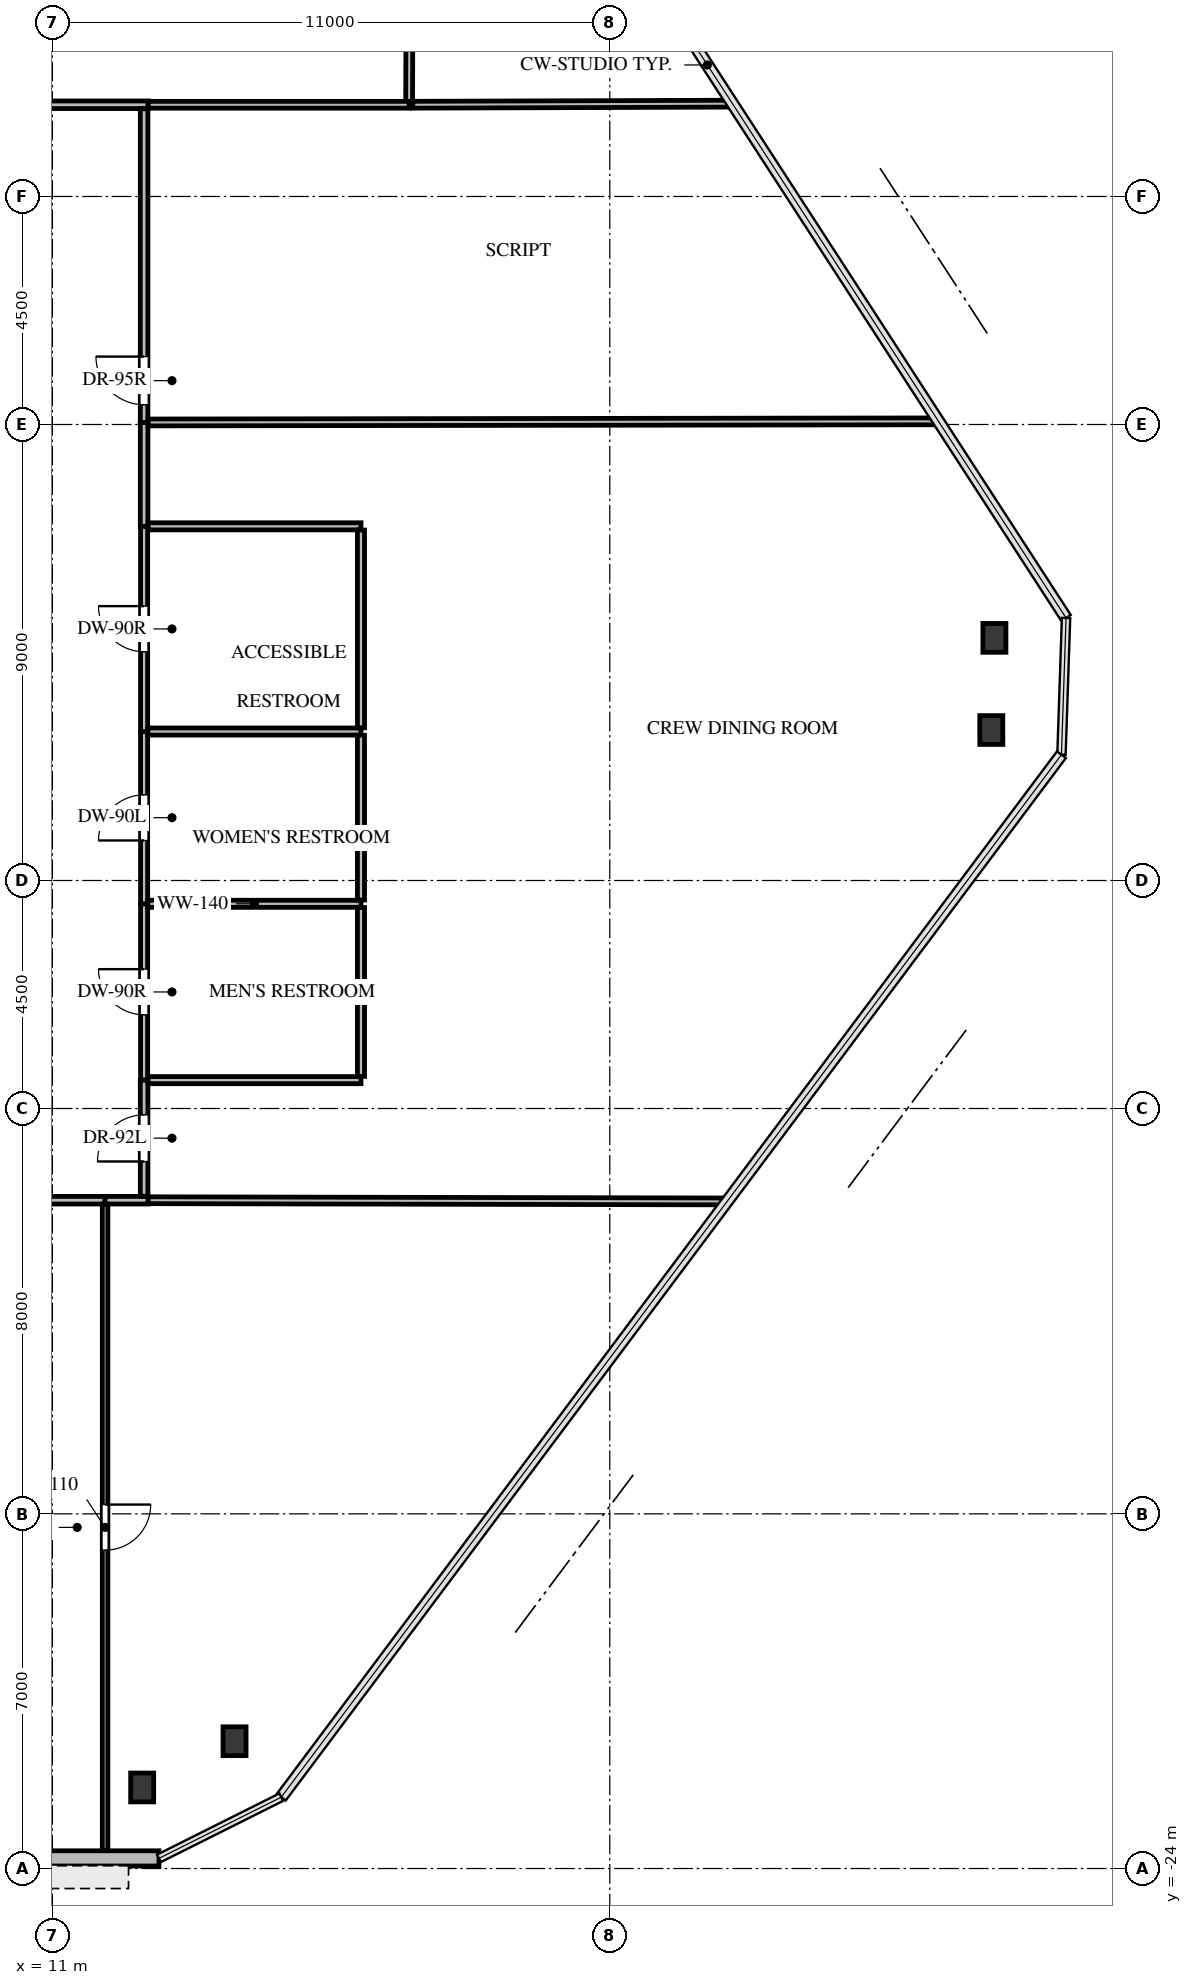
"""IFC4 building model, lengths in metres.
Left out: names, types, materials, properties, quantities, classifications, styles, units other than length and angle.
Written with IfcOpenShell. Run it as: python <this file> out.ifc"""

import sys

from ifc_helpers import new_model, si_unit, direction, frame, frame_2d, origin, origin_2d, place, context, subcontext, project, spatial, rectangle, i_section, extrude, source, transform, mapped, element, fill, save


model = new_model("IFC4")
c1 = context("Model", 3, precision=1e-05, world=origin(), true_north=direction((0.0, 1.0)))
c2 = subcontext(c1, "Body", "Model", "MODEL_VIEW")
j1 = project(units=[si_unit("LENGTHUNIT", "METRE"), si_unit("PLANEANGLEUNIT", "RADIAN")], contexts=[c1])
p1 = place(None, origin())
s1 = spatial("IfcSite", under=j1, at=p1, CompositionType="ELEMENT")
p2 = place(p1, origin())
s2 = spatial("IfcBuilding", under=s1, at=p2, CompositionType="ELEMENT")
p3 = place(p2, frame((0.0, 0.0, 21.2)))
s3 = spatial("IfcBuildingStorey", under=s2, at=p3, CompositionType="ELEMENT", Elevation=21.2)
m1 = source(origin(), c2, "Body", "SweptSolid", [
    extrude(i_section(OverallWidth=0.454, OverallDepth=0.569, WebThickness=0.078, FlangeThickness=0.125, FilletRadius=0.031, at=origin_2d()), origin(), (0.0, 0.0, 1.0), 5.6),
])
for number, where, z_axis, x_axis in (
    (1, (29.591, 0.289, -0.32), (0.0, 0.0, 1.0), (1.0, 0.0, 0.0)),
    (2, (29.529, -1.531, -0.32), (0.0, 0.0, 1.0), (1.0, 0.0, 0.0)),
    (3, (14.594, -21.488, -0.32), (0.0, 0.0, 1.0), (1.0, 0.0, 0.0)),
    (4, (12.772, -22.4, -0.32), (0.0, 0.0, 1.0), (1.0, 0.0, 0.0)),
):
    element("IfcColumn", number, at=place(p3, frame(where, z_axis=z_axis, x_axis=x_axis)), inside=s3, PredefinedType="COLUMN", context=c2, shape_type="MappedRepresentation", body=[
        mapped(m1, transform((0.0, 0.0, 0.0), x_axis=(1.0, 0.0, 0.0), y_axis=(0.0, 1.0, 0.0), z_axis=(0.0, 0.0, 1.0), scale=1.0)),
    ])
p4 = place(p3, frame((13.103, -23.8, 0.0), z_axis=(0.0, 0.0, 1.0), x_axis=(-1.0, 0.0, 0.0)))
e5 = element("IfcWall", 5, at=p4, inside=s3, PredefinedType="SOLIDWALL", context=c2, shape_type="SweptSolid", body=[
    extrude(rectangle(XDim=27.578, YDim=0.3, at=frame_2d((13.789, 0.0))), origin(), (0.0, 0.0, 1.0), 5.28),
])
p5 = place(p4, frame((3.0, 0.0, 1.0)))
e6 = element("IfcOpeningElement", 6, at=p5, cuts=e5, PredefinedType="OPENING", context=c2, shape_type="SweptSolid", body=[
    extrude(rectangle(XDim=2.4, YDim=2.1, at=frame_2d((1.2, 1.05))), frame((0.0, 0.16, 0.0), z_axis=(0.0, -1.0, 0.0), x_axis=(1.0, 0.0, 0.0)), (0.0, 0.0, 1.0), 0.32),
])
p6 = place(p4, frame((22.178, 0.0, 1.0)))
e7 = element("IfcOpeningElement", 7, at=p6, cuts=e5, PredefinedType="OPENING", context=c2, shape_type="SweptSolid", body=[
    extrude(rectangle(XDim=2.4, YDim=2.1, at=frame_2d((1.2, 1.05))), frame((0.0, 0.16, 0.0), z_axis=(0.0, -1.0, 0.0), x_axis=(1.0, 0.0, 0.0)), (0.0, 0.0, 1.0), 0.32),
])
p7 = place(p3, frame((12.81, -8.44, 0.0), z_axis=(0.0, 0.0, 1.0), x_axis=(0.0, 1.0, 0.0)))
e8 = element("IfcWall", 8, at=p7, inside=s3, PredefinedType="PARTITIONING", context=c2, shape_type="SweptSolid", body=[
    extrude(rectangle(XDim=3.48, YDim=0.14, at=frame_2d((1.74, 0.0))), origin(), (0.0, 0.0, 1.0), 5.265),
])
p8 = place(p7, frame((1.29, 0.0, 0.0)))
e9 = element("IfcOpeningElement", 9, at=p8, cuts=e8, PredefinedType="OPENING", context=c2, shape_type="SweptSolid", body=[
    extrude(rectangle(XDim=0.9, YDim=2.05, at=frame_2d((0.45, 1.025))), frame((0.0, 0.08, 0.0), z_axis=(0.0, -1.0, 0.0), x_axis=(1.0, 0.0, 0.0)), (0.0, 0.0, 1.0), 0.16),
])
p9 = place(p3, frame((12.81, -4.96, 0.0), z_axis=(0.0, 0.0, 1.0), x_axis=(0.0, 1.0, 0.0)))
e10 = element("IfcWall", 10, at=p9, inside=s3, PredefinedType="PARTITIONING", context=c2, shape_type="SweptSolid", body=[
    extrude(rectangle(XDim=3.4, YDim=0.14, at=frame_2d((1.7, 0.0))), origin(), (0.0, 0.0, 1.0), 4.285),
])
p10 = place(p9, frame((1.25, 0.0, 0.0)))
e11 = element("IfcOpeningElement", 11, at=p10, cuts=e10, PredefinedType="OPENING", context=c2, shape_type="SweptSolid", body=[
    extrude(rectangle(XDim=0.9, YDim=2.05, at=frame_2d((0.45, 1.025))), frame((0.0, 0.08, 0.0), z_axis=(0.0, -1.0, 0.0), x_axis=(1.0, 0.0, 0.0)), (0.0, 0.0, 1.0), 0.16),
])
p11 = place(p3, frame((12.81, -1.56, 0.0), z_axis=(0.0, 0.0, 1.0), x_axis=(0.0, 1.0, 0.0)))
e12 = element("IfcWall", 12, at=p11, inside=s3, PredefinedType="PARTITIONING", context=c2, shape_type="SweptSolid", body=[
    extrude(rectangle(XDim=4.05, YDim=0.14, at=frame_2d((2.025, 0.0))), origin(), (0.0, 0.0, 1.0), 4.285),
])
p12 = place(p11, frame((1.575, 0.0, 0.0)))
e13 = element("IfcOpeningElement", 13, at=p12, cuts=e12, PredefinedType="OPENING", context=c2, shape_type="SweptSolid", body=[
    extrude(rectangle(XDim=0.9, YDim=2.05, at=frame_2d((0.45, 1.025))), frame((0.0, 0.08, 0.0), z_axis=(0.0, -1.0, 0.0), x_axis=(1.0, 0.0, 0.0)), (0.0, 0.0, 1.0), 0.16),
])
p13 = place(p3, frame((12.89, 10.81, 0.0), z_axis=(0.0, 0.0, 1.0), x_axis=(-1.0, 0.0, 0.0)))
e14 = element("IfcWall", 14, at=p13, inside=s3, PredefinedType="PARTITIONING", context=c2, shape_type="SweptSolid", body=[
    extrude(rectangle(XDim=4.85, YDim=0.15, at=frame_2d((2.425, 0.0))), origin(), (0.0, 0.0, 1.0), 4.285),
])
p14 = place(p13, frame((1.95, 0.0, 0.0)))
e15 = element("IfcOpeningElement", 15, at=p14, cuts=e14, PredefinedType="OPENING", context=c2, shape_type="SweptSolid", body=[
    extrude(rectangle(XDim=0.95, YDim=2.1, at=frame_2d((0.475, 1.05))), frame((0.0, 0.085, 0.0), z_axis=(0.0, -1.0, 0.0), x_axis=(1.0, 0.0, 0.0)), (0.0, 0.0, 1.0), 0.17),
])
p15 = place(p3, frame((0.04, -10.81, 0.0), z_axis=(0.0, 0.0, 1.0), x_axis=(1.0, 0.0, 0.0)))
e16 = element("IfcWall", 16, at=p15, inside=s3, PredefinedType="PARTITIONING", context=c2, shape_type="SweptSolid", body=[
    extrude(rectangle(XDim=12.0, YDim=0.15, at=frame_2d((6.0, 0.0))), origin(), (0.0, 0.0, 1.0), 4.285),
])
p16 = place(p15, frame((0.35, 0.0, 0.0)))
e17 = element("IfcOpeningElement", 17, at=p16, cuts=e16, PredefinedType="OPENING", context=c2, shape_type="SweptSolid", body=[
    extrude(rectangle(XDim=1.6, YDim=2.15, at=frame_2d((0.8, 1.075))), frame((0.0, 0.085, 0.0), z_axis=(0.0, -1.0, 0.0), x_axis=(1.0, 0.0, 0.0)), (0.0, 0.0, 1.0), 0.17),
])
p17 = place(p3, frame((12.04, -10.81, 0.0), z_axis=(0.0, 0.0, 1.0), x_axis=(1.0, 0.0, 0.0)))
e18 = element("IfcWall", 18, at=p17, inside=s3, PredefinedType="PARTITIONING", context=c2, shape_type="SweptSolid", body=[
    extrude(rectangle(XDim=0.85, YDim=0.15, at=frame_2d((0.425, 0.0))), origin(), (0.0, 0.0, 1.0), 5.265),
])
p18 = place(p3, frame((12.81, -10.731, 0.0), z_axis=(0.0, 0.0, 1.0), x_axis=(0.0, 1.0, 0.0)))
e19 = element("IfcWall", 19, at=p18, inside=s3, PredefinedType="PARTITIONING", context=c2, shape_type="SweptSolid", body=[
    extrude(rectangle(XDim=2.291, YDim=0.15, at=frame_2d((1.146, 0.0))), origin(), (0.0, 0.0, 1.0), 5.265),
])
p19 = place(p18, frame((0.686, 0.0, 0.0)))
e20 = element("IfcOpeningElement", 20, at=p19, cuts=e19, PredefinedType="OPENING", context=c2, shape_type="SweptSolid", body=[
    extrude(rectangle(XDim=0.92, YDim=2.1, at=frame_2d((0.46, 1.05))), frame((0.0, 0.085, 0.0), z_axis=(0.0, -1.0, 0.0), x_axis=(1.0, 0.0, 0.0)), (0.0, 0.0, 1.0), 0.17),
])
p20 = place(p3, frame((12.81, 2.49, 0.0), z_axis=(0.0, 0.0, 1.0), x_axis=(0.0, 1.0, 0.0)))
e21 = element("IfcWall", 21, at=p20, inside=s3, PredefinedType="PARTITIONING", context=c2, shape_type="SweptSolid", body=[
    extrude(rectangle(XDim=2.05, YDim=0.15, at=frame_2d((1.025, 0.0))), origin(), (0.0, 0.0, 1.0), 5.265),
])
p21 = place(p3, frame((12.81, 4.54, 0.0), z_axis=(0.0, 0.0, 1.0), x_axis=(0.0, 1.0, 0.0)))
e22 = element("IfcWall", 22, at=p21, inside=s3, PredefinedType="PARTITIONING", context=c2, shape_type="SweptSolid", body=[
    extrude(rectangle(XDim=6.191, YDim=0.15, at=frame_2d((3.095, 0.0))), origin(), (0.0, 0.0, 1.0), 5.265),
])
p22 = place(p21, frame((0.35, 0.0, 0.0)))
e23 = element("IfcOpeningElement", 23, at=p22, cuts=e22, PredefinedType="OPENING", context=c2, shape_type="SweptSolid", body=[
    extrude(rectangle(XDim=0.95, YDim=2.1, at=frame_2d((0.475, 1.05))), frame((0.0, 0.085, 0.0), z_axis=(0.0, -1.0, 0.0), x_axis=(1.0, 0.0, 0.0)), (0.0, 0.0, 1.0), 0.17),
])
p23 = place(p3, frame((12.884, -4.96, 0.0), z_axis=(0.0, 0.0, 1.0), x_axis=(1.0, 0.0, 0.0)))
e24 = element("IfcWall", 24, at=p23, inside=s3, PredefinedType="PARTITIONING", context=c2, shape_type="SweptSolid", body=[
    extrude(rectangle(XDim=4.206, YDim=0.14, at=frame_2d((2.103, 0.0))), origin(), (0.0, 0.0, 1.0), 5.265),
])
p24 = place(p3, frame((17.09, -8.44, 0.0), z_axis=(0.0, 0.0, 1.0), x_axis=(-1.0, 0.0, 0.0)))
e25 = element("IfcWall", 25, at=p24, inside=s3, PredefinedType="PARTITIONING", context=c2, shape_type="SweptSolid", body=[
    extrude(rectangle(XDim=4.201, YDim=0.14, at=frame_2d((2.101, 0.0))), origin(), (0.0, 0.0, 1.0), 5.265),
])
p25 = place(p3, frame((17.09, -5.034, 0.0), z_axis=(0.0, 0.0, 1.0), x_axis=(0.0, -1.0, 0.0)))
e26 = element("IfcWall", 26, at=p25, inside=s3, PredefinedType="PARTITIONING", context=c2, shape_type="SweptSolid", body=[
    extrude(rectangle(XDim=3.332, YDim=0.14, at=frame_2d((1.666, 0.0))), origin(), (0.0, 0.0, 1.0), 5.265),
])
p26 = place(p3, frame((12.884, -1.56, 0.0), z_axis=(0.0, 0.0, 1.0), x_axis=(1.0, 0.0, 0.0)))
e27 = element("IfcWall", 27, at=p26, inside=s3, PredefinedType="PARTITIONING", context=c2, shape_type="SweptSolid", body=[
    extrude(rectangle(XDim=4.206, YDim=0.14, at=frame_2d((2.103, 0.0))), origin(), (0.0, 0.0, 1.0), 5.265),
])
p27 = place(p3, frame((17.09, -1.634, 0.0), z_axis=(0.0, 0.0, 1.0), x_axis=(0.0, -1.0, 0.0)))
e28 = element("IfcWall", 28, at=p27, inside=s3, PredefinedType="PARTITIONING", context=c2, shape_type="SweptSolid", body=[
    extrude(rectangle(XDim=3.252, YDim=0.14, at=frame_2d((1.626, 0.0))), origin(), (0.0, 0.0, 1.0), 4.285),
])
p28 = place(p3, frame((12.889, 2.49, 0.0), z_axis=(0.0, 0.0, 1.0), x_axis=(1.0, 0.0, 0.0)))
e29 = element("IfcWall", 29, at=p28, inside=s3, PredefinedType="PARTITIONING", context=c2, shape_type="SweptSolid", body=[
    extrude(rectangle(XDim=4.201, YDim=0.14, at=frame_2d((2.101, 0.0))), origin(), (0.0, 0.0, 1.0), 5.265),
])
p29 = place(p3, frame((17.09, 2.416, 0.0), z_axis=(0.0, 0.0, 1.0), x_axis=(0.0, -1.0, 0.0)))
e30 = element("IfcWall", 30, at=p29, inside=s3, PredefinedType="PARTITIONING", context=c2, shape_type="SweptSolid", body=[
    extrude(rectangle(XDim=3.902, YDim=0.14, at=frame_2d((1.951, 0.0))), origin(), (0.0, 0.0, 1.0), 4.285),
])
p30 = place(p3, frame((18.073, 20.62, 0.0), z_axis=(0.0, 0.0, 1.0), x_axis=(-0.003409382171, -0.99999418804, 0.0)))
e31 = element("IfcWall", 31, at=p30, inside=s3, PredefinedType="PARTITIONING", context=c2, shape_type="SweptSolid", body=[
    extrude(rectangle(XDim=9.81, YDim=0.135, at=frame_2d((4.905, 0.0))), origin(), (0.0, 0.0, 1.0), 4.574),
])
p31 = place(p30, frame((4.455, 0.0, 0.0)))
e32 = element("IfcOpeningElement", 32, at=p31, cuts=e31, PredefinedType="OPENING", context=c2, shape_type="SweptSolid", body=[
    extrude(rectangle(XDim=0.9, YDim=2.05, at=frame_2d((0.45, 1.025))), frame((0.0, 0.078, 0.0), z_axis=(0.0, -1.0, 0.0), x_axis=(1.0, 0.0, 0.0)), (0.0, 0.0, 1.0), 0.155),
])
p32 = place(p3, frame((18.04, 10.81, 0.0), z_axis=(0.0, 0.0, 1.0), x_axis=(-1.0, 0.0, 0.0)))
e33 = element("IfcWall", 33, at=p32, inside=s3, PredefinedType="PARTITIONING", context=c2, shape_type="SweptSolid", body=[
    extrude(rectangle(XDim=5.15, YDim=0.135, at=frame_2d((2.575, 0.0))), origin(), (0.0, 0.0, 1.0), 5.265),
])
p33 = place(p3, frame((24.422, 10.832, 0.0), z_axis=(0.0, 0.0, 1.0), x_axis=(-0.999994334762, -0.003366072395, 0.0)))
e34 = element("IfcWall", 34, at=p33, inside=s3, PredefinedType="PARTITIONING", context=c2, shape_type="SweptSolid", body=[
    extrude(rectangle(XDim=6.31, YDim=0.135, at=frame_2d((3.155, 0.0))), origin(), (0.0, 0.0, 1.0), 4.574),
])
p34 = place(p3, frame((12.04, -10.889, 0.0), z_axis=(0.0, 0.0, 1.0), x_axis=(0.0, -1.0, 0.0)))
e35 = element("IfcWall", 35, at=p34, inside=s3, PredefinedType="MOVABLE", context=c2, shape_type="SweptSolid", body=[
    extrude(rectangle(XDim=12.756, YDim=0.11, at=frame_2d((6.378, 0.0))), origin(), (0.0, 0.0, 1.0), 4.285),
])
p35 = place(p34, frame((5.928, 0.0, 0.0)))
e36 = element("IfcOpeningElement", 36, at=p35, cuts=e35, PredefinedType="OPENING", context=c2, shape_type="SweptSolid", body=[
    extrude(rectangle(XDim=0.9, YDim=2.05, at=frame_2d((0.45, 1.025))), frame((0.0, 0.065, 0.0), z_axis=(0.0, -1.0, 0.0), x_axis=(1.0, 0.0, 0.0)), (0.0, 0.0, 1.0), 0.13),
])
p36 = place(p3, frame((12.89, -10.81, 0.0), z_axis=(0.0, 0.0, 1.0), x_axis=(0.999997852069, -0.002072645121, 0.0)))
e37 = element("IfcWall", 37, at=p36, inside=s3, PredefinedType="PARTITIONING", context=c2, shape_type="SweptSolid", body=[
    extrude(rectangle(XDim=11.426, YDim=0.135, at=frame_2d((5.713, 0.0))), origin(), (0.0, 0.0, 1.0), 4.574),
])
p37 = place(p3, frame((12.889, 4.54, 0.0), z_axis=(0.0, 0.0, 1.0), x_axis=(0.999999029841, 0.001392952493, 0.0)))
e38 = element("IfcWall", 38, at=p37, inside=s3, PredefinedType="PARTITIONING", context=c2, shape_type="SweptSolid", body=[
    extrude(rectangle(XDim=15.599, YDim=0.135, at=frame_2d((7.799, 0.0))), origin(), (0.0, 0.0, 1.0), 4.574),
])
m2 = source(origin(), c2, "Body", "SweptSolid", [
    extrude(rectangle(XDim=0.9, YDim=2.05, at=frame_2d((0.45, 1.025))), frame((0.0, 0.025, 0.0), z_axis=(0.0, -1.0, 0.0), x_axis=(1.0, 0.0, 0.0)), (0.0, 0.0, 1.0), 0.05),
])
p38 = place(p8, origin())
e39 = element("IfcDoor", 39, at=p38, inside=s3, OperationType="SINGLE_SWING_RIGHT", PredefinedType="DOOR", context=c2, shape_type="MappedRepresentation", body=[
    mapped(m2, transform((0.0, 0.0, 0.0), x_axis=(1.0, 0.0, 0.0), y_axis=(0.0, 1.0, 0.0), z_axis=(0.0, 0.0, 1.0), scale=1.0)),
])
fill(e9, e39)
m3 = source(origin(), c2, "Body", "SweptSolid", [
    extrude(rectangle(XDim=0.9, YDim=2.05, at=frame_2d((0.45, 1.025))), frame((0.0, 0.025, 0.0), z_axis=(0.0, -1.0, 0.0), x_axis=(1.0, 0.0, 0.0)), (0.0, 0.0, 1.0), 0.05),
])
p39 = place(p10, origin())
e40 = element("IfcDoor", 40, at=p39, inside=s3, OperationType="SINGLE_SWING_LEFT", PredefinedType="DOOR", context=c2, shape_type="MappedRepresentation", body=[
    mapped(m3, transform((0.0, 0.0, 0.0), x_axis=(1.0, 0.0, 0.0), y_axis=(0.0, 1.0, 0.0), z_axis=(0.0, 0.0, 1.0), scale=1.0)),
])
fill(e11, e40)
p40 = place(p12, origin())
e41 = element("IfcDoor", 41, at=p40, inside=s3, OperationType="SINGLE_SWING_RIGHT", PredefinedType="DOOR", context=c2, shape_type="MappedRepresentation", body=[
    mapped(m2, transform((0.0, 0.0, 0.0), x_axis=(1.0, 0.0, 0.0), y_axis=(0.0, 1.0, 0.0), z_axis=(0.0, 0.0, 1.0), scale=1.0)),
])
fill(e13, e41)
m4 = source(origin(), c2, "Body", "SweptSolid", [
    extrude(rectangle(XDim=0.92, YDim=2.1, at=frame_2d((0.46, 1.05))), frame((0.0, 0.025, 0.0), z_axis=(0.0, -1.0, 0.0), x_axis=(1.0, 0.0, 0.0)), (0.0, 0.0, 1.0), 0.05),
])
p41 = place(p19, origin())
e42 = element("IfcDoor", 42, at=p41, inside=s3, OperationType="SINGLE_SWING_LEFT", PredefinedType="DOOR", context=c2, shape_type="MappedRepresentation", body=[
    mapped(m4, transform((0.0, 0.0, 0.0), x_axis=(1.0, 0.0, 0.0), y_axis=(0.0, 1.0, 0.0), z_axis=(0.0, 0.0, 1.0), scale=1.0)),
])
fill(e20, e42)
m5 = source(origin(), c2, "Body", "SweptSolid", [
    extrude(rectangle(XDim=0.95, YDim=2.1, at=frame_2d((0.475, 1.05))), frame((0.0, 0.025, 0.0), z_axis=(0.0, -1.0, 0.0), x_axis=(1.0, 0.0, 0.0)), (0.0, 0.0, 1.0), 0.05),
])
p42 = place(p22, origin())
e43 = element("IfcDoor", 43, at=p42, inside=s3, OperationType="SINGLE_SWING_RIGHT", PredefinedType="DOOR", context=c2, shape_type="MappedRepresentation", body=[
    mapped(m5, transform((0.0, 0.0, 0.0), x_axis=(1.0, 0.0, 0.0), y_axis=(0.0, 1.0, 0.0), z_axis=(0.0, 0.0, 1.0), scale=1.0)),
])
fill(e23, e43)
p43 = place(p35, origin())
e44 = element("IfcDoor", 44, at=p43, inside=s3, OperationType="SINGLE_SWING_LEFT", PredefinedType="DOOR", context=c2, shape_type="MappedRepresentation", body=[
    mapped(m3, transform((0.0, 0.0, 0.0), x_axis=(1.0, 0.0, 0.0), y_axis=(0.0, 1.0, 0.0), z_axis=(0.0, 0.0, 1.0), scale=1.0)),
])
fill(e36, e44)
save(model, sys.argv[1])
